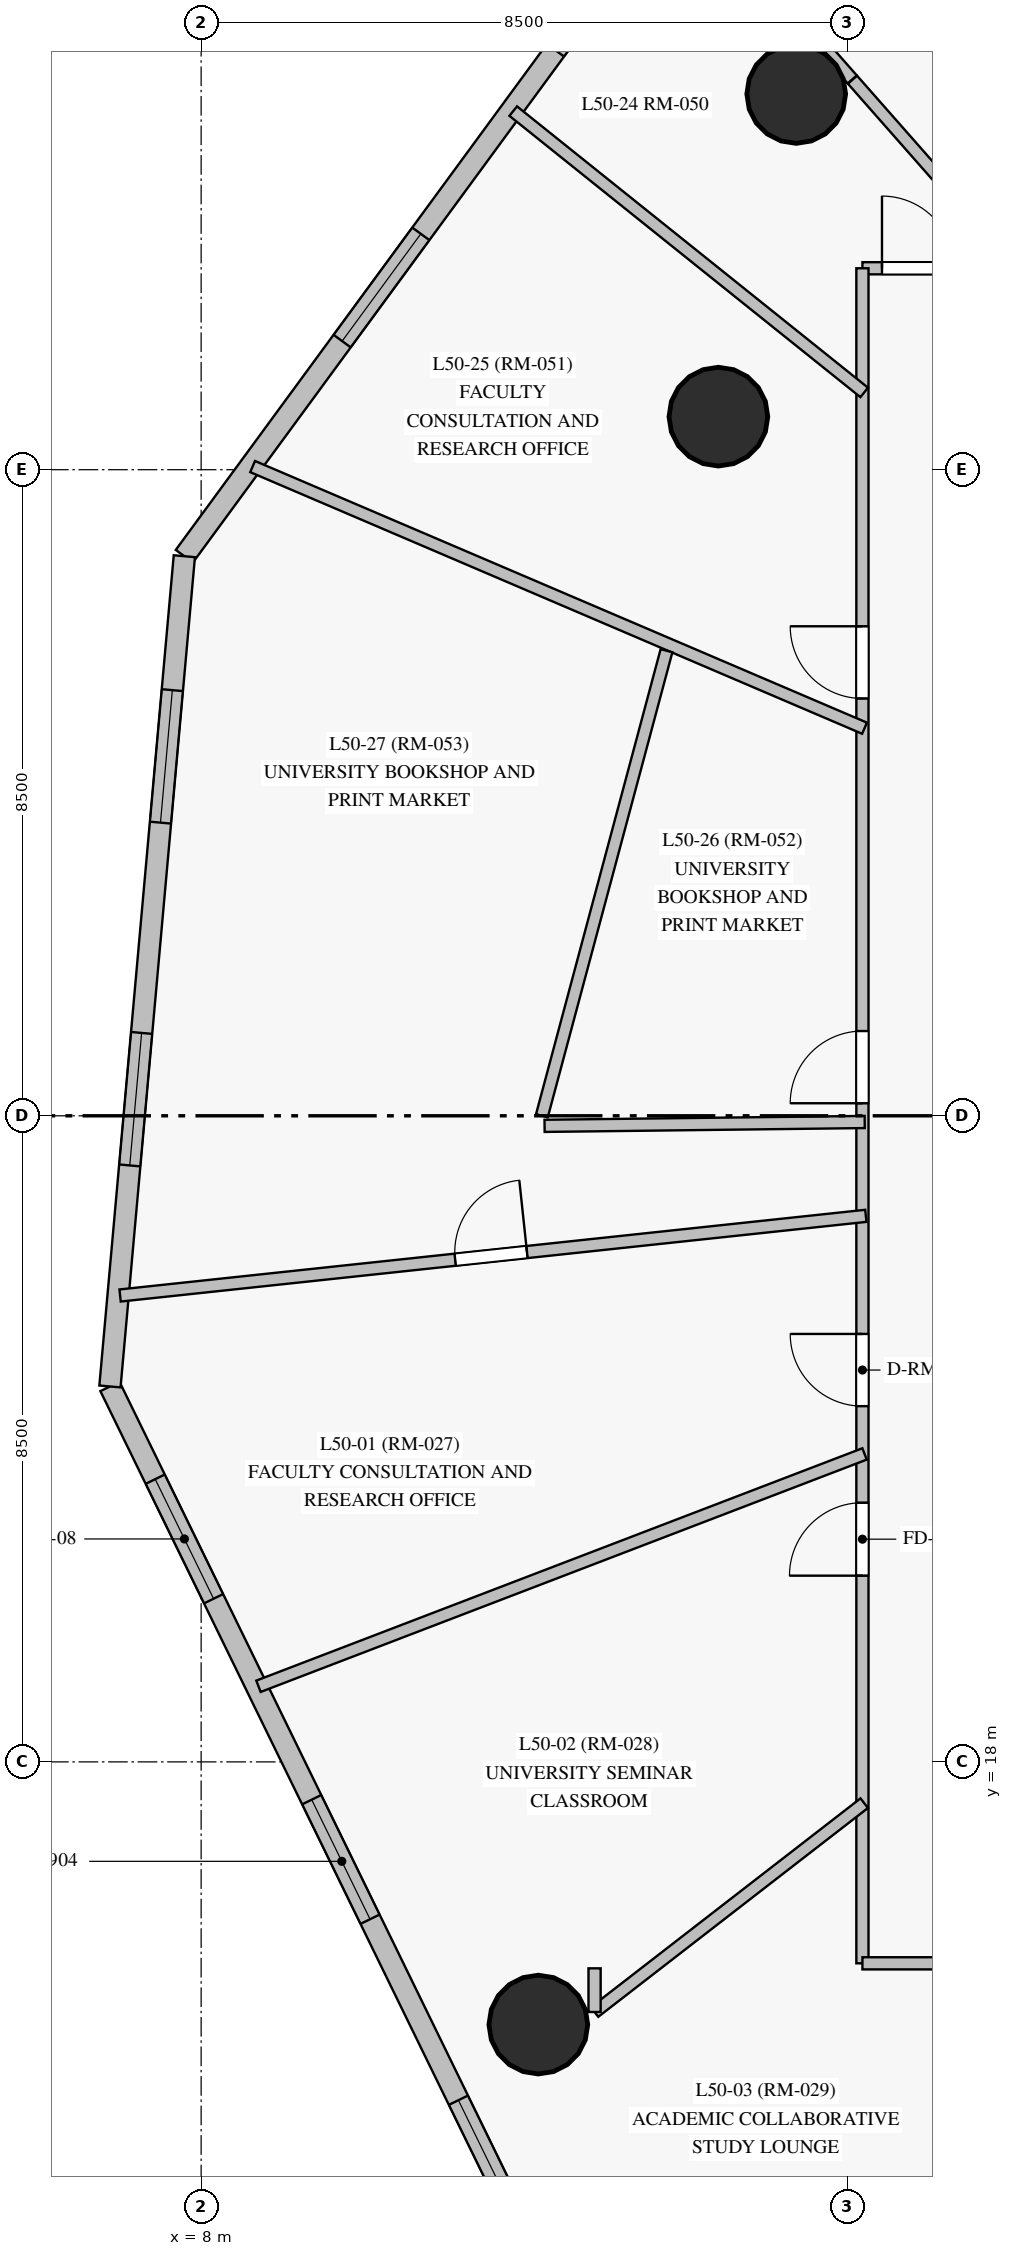
"""IFC4 building model, lengths in metres.
Left out: names, types, materials, properties, quantities, classifications, styles, units other than length and angle.
Written with IfcOpenShell. Run it as: python <this file> out.ifc"""

import sys

from ifc_helpers import new_model, si_unit, direction, frame, frame_2d, origin, origin_with_axes, origin_2d, place, context, subcontext, project, spatial, rectangle, circle, extrude, source, transform, mapped, element, fill, save


model = new_model("IFC4")
c1 = context("Model", 3, precision=1e-05, world=origin(), true_north=direction((0.0, 1.0)))
c2 = subcontext(c1, "Body", "Model", "MODEL_VIEW")
j1 = project(units=[si_unit("LENGTHUNIT", "METRE"), si_unit("PLANEANGLEUNIT", "RADIAN")], contexts=[c1])
p1 = place(None, origin())
s1 = spatial("IfcSite", under=j1, at=p1, CompositionType="ELEMENT")
p2 = place(p1, origin())
s2 = spatial("IfcBuilding", under=s1, at=p2, CompositionType="ELEMENT")
p3 = place(p2, frame((0.0, 0.0, 174.85)))
s3 = spatial("IfcBuildingStorey", under=s2, at=p3, CompositionType="ELEMENT", Elevation=174.85)
m1 = source(origin_with_axes(), c2, "Body", "SweptSolid", [
    extrude(circle(Radius=0.65, at=origin_2d()), origin(), (0.0, 0.0, 1.0), 3.05),
])
for number, where, z_axis, x_axis in (
    (1, (15.829, 39.943, 0.0), (0.0, 0.0, 1.0), (1.0, 0.0, 0.0)),
    (2, (14.805, 35.698, 0.0), (0.0, 0.0, 1.0), (1.0, 0.0, 0.0)),
    (3, (12.436, 14.544, 0.0), (0.0, 0.0, 1.0), (1.0, 0.0, 0.0)),
):
    element("IfcColumn", number, at=place(p3, frame(where, z_axis=z_axis, x_axis=x_axis)), inside=s3, PredefinedType="COLUMN", context=c2, shape_type="MappedRepresentation", body=[
        mapped(m1, transform((0.0, 0.0, 0.0), scale=1.0)),
    ])
p4 = place(p3, frame((6.8, 22.939, 0.0), z_axis=(0.0, 0.0, 1.0), x_axis=(0.438723195054, -0.898622255523, 0.0)))
e4 = element("IfcWall", 4, at=p4, inside=s3, PredefinedType="SOLIDWALL", context=c2, shape_type="SweptSolid", body=[
    extrude(rectangle(XDim=13.904, YDim=0.28, at=frame_2d((6.952, 0.0))), origin(), (0.0, 0.0, 1.0), 2.825),
])
p5 = place(p4, frame((1.357, 0.0, 0.85)))
e5 = element("IfcOpeningElement", 5, at=p5, cuts=e4, PredefinedType="OPENING", context=c2, shape_type="SweptSolid", body=[
    extrude(rectangle(XDim=1.75, YDim=1.65, at=frame_2d((0.875, 0.825))), frame((0.0, 0.15, 0.0), z_axis=(0.0, -1.0, 0.0), x_axis=(1.0, 0.0, 0.0)), (0.0, 0.0, 1.0), 0.3),
])
p6 = place(p4, frame((6.05, 0.0, 0.85)))
e6 = element("IfcOpeningElement", 6, at=p6, cuts=e4, PredefinedType="OPENING", context=c2, shape_type="SweptSolid", body=[
    extrude(rectangle(XDim=1.75, YDim=1.65, at=frame_2d((0.875, 0.825))), frame((0.0, 0.15, 0.0), z_axis=(0.0, -1.0, 0.0), x_axis=(1.0, 0.0, 0.0)), (0.0, 0.0, 1.0), 0.3),
])
p7 = place(p4, frame((10.449, 0.0, 0.85)))
e7 = element("IfcOpeningElement", 7, at=p7, cuts=e4, PredefinedType="OPENING", context=c2, shape_type="SweptSolid", body=[
    extrude(rectangle(XDim=1.75, YDim=1.65, at=frame_2d((0.875, 0.825))), frame((0.0, 0.15, 0.0), z_axis=(0.0, -1.0, 0.0), x_axis=(1.0, 0.0, 0.0)), (0.0, 0.0, 1.0), 0.3),
])
p8 = place(p3, frame((16.003, 45.073, 0.0), z_axis=(0.0, 0.0, 1.0), x_axis=(-0.591484690677, -0.806316228718, 0.0)))
e8 = element("IfcWall", 8, at=p8, inside=s3, PredefinedType="SOLIDWALL", context=c2, shape_type="SweptSolid", body=[
    extrude(rectangle(XDim=13.904, YDim=0.28, at=frame_2d((6.952, 0.0))), origin(), (0.0, 0.0, 1.0), 2.825),
])
p9 = place(p8, frame((0.617, 0.0, 0.85)))
e9 = element("IfcOpeningElement", 9, at=p9, cuts=e8, PredefinedType="OPENING", context=c2, shape_type="SweptSolid", body=[
    extrude(rectangle(XDim=1.75, YDim=1.65, at=frame_2d((0.875, 0.825))), frame((0.0, 0.15, 0.0), z_axis=(0.0, -1.0, 0.0), x_axis=(1.0, 0.0, 0.0)), (0.0, 0.0, 1.0), 0.3),
])
p10 = place(p8, frame((3.899, 0.0, 0.85)))
e10 = element("IfcOpeningElement", 10, at=p10, cuts=e8, PredefinedType="OPENING", context=c2, shape_type="SweptSolid", body=[
    extrude(rectangle(XDim=1.75, YDim=1.65, at=frame_2d((0.875, 0.825))), frame((0.0, 0.15, 0.0), z_axis=(0.0, -1.0, 0.0), x_axis=(1.0, 0.0, 0.0)), (0.0, 0.0, 1.0), 0.3),
])
p11 = place(p8, frame((8.644, 0.0, 0.85)))
e11 = element("IfcOpeningElement", 11, at=p11, cuts=e8, PredefinedType="OPENING", context=c2, shape_type="SweptSolid", body=[
    extrude(rectangle(XDim=1.75, YDim=1.65, at=frame_2d((0.875, 0.825))), frame((0.0, 0.15, 0.0), z_axis=(0.0, -1.0, 0.0), x_axis=(1.0, 0.0, 0.0)), (0.0, 0.0, 1.0), 0.3),
])
p12 = place(p3, frame((7.779, 33.862, 0.0), z_axis=(0.0, 0.0, 1.0), x_axis=(-0.08925100572, -0.996009165609, 0.0)))
e12 = element("IfcWall", 12, at=p12, inside=s3, PredefinedType="SOLIDWALL", context=c2, shape_type="SweptSolid", body=[
    extrude(rectangle(XDim=10.966, YDim=0.28, at=frame_2d((5.483, 0.0))), origin(), (0.0, 0.0, 1.0), 2.825),
])
p13 = place(p12, frame((1.769, 0.0, 0.85)))
e13 = element("IfcOpeningElement", 13, at=p13, cuts=e12, PredefinedType="OPENING", context=c2, shape_type="SweptSolid", body=[
    extrude(rectangle(XDim=1.75, YDim=1.65, at=frame_2d((0.875, 0.825))), frame((0.0, 0.15, 0.0), z_axis=(0.0, -1.0, 0.0), x_axis=(1.0, 0.0, 0.0)), (0.0, 0.0, 1.0), 0.3),
])
p14 = place(p12, frame((6.297, 0.0, 0.85)))
e14 = element("IfcOpeningElement", 14, at=p14, cuts=e12, PredefinedType="OPENING", context=c2, shape_type="SweptSolid", body=[
    extrude(rectangle(XDim=1.75, YDim=1.65, at=frame_2d((0.875, 0.825))), frame((0.0, 0.15, 0.0), z_axis=(0.0, -1.0, 0.0), x_axis=(1.0, 0.0, 0.0)), (0.0, 0.0, 1.0), 0.3),
])
p15 = place(p3, frame((16.7, 37.65, 0.0), z_axis=(0.0, 0.0, 1.0), x_axis=(1.0, 0.0, 0.0)))
e15 = element("IfcWall", 15, at=p15, inside=s3, PredefinedType="PARTITIONING", context=c2, shape_type="SweptSolid", body=[
    extrude(rectangle(XDim=23.5, YDim=0.16, at=frame_2d((11.75, 0.0))), origin(), (0.0, 0.0, 1.0), 2.375),
])
p16 = place(p15, frame((17.15, 0.0, 0.0)))
e16 = element("IfcOpeningElement", 16, at=p16, cuts=e15, PredefinedType="OPENING", context=c2, shape_type="SweptSolid", body=[
    extrude(rectangle(XDim=0.95, YDim=2.15, at=frame_2d((0.475, 1.075))), frame((0.0, 0.09, 0.0), z_axis=(0.0, -1.0, 0.0), x_axis=(1.0, 0.0, 0.0)), (0.0, 0.0, 1.0), 0.18),
])
p17 = place(p15, frame((14.31, 0.0, 0.0)))
e17 = element("IfcOpeningElement", 17, at=p17, cuts=e15, PredefinedType="OPENING", context=c2, shape_type="SweptSolid", body=[
    extrude(rectangle(XDim=0.95, YDim=2.15, at=frame_2d((0.475, 1.075))), frame((0.0, 0.09, 0.0), z_axis=(0.0, -1.0, 0.0), x_axis=(1.0, 0.0, 0.0)), (0.0, 0.0, 1.0), 0.18),
])
p18 = place(p15, frame((11.915, 0.0, 0.0)))
e18 = element("IfcOpeningElement", 18, at=p18, cuts=e15, PredefinedType="OPENING", context=c2, shape_type="SweptSolid", body=[
    extrude(rectangle(XDim=0.95, YDim=2.15, at=frame_2d((0.475, 1.075))), frame((0.0, 0.09, 0.0), z_axis=(0.0, -1.0, 0.0), x_axis=(1.0, 0.0, 0.0)), (0.0, 0.0, 1.0), 0.18),
])
p19 = place(p15, frame((7.75, 0.0, 0.0)))
e19 = element("IfcOpeningElement", 19, at=p19, cuts=e15, PredefinedType="OPENING", context=c2, shape_type="SweptSolid", body=[
    extrude(rectangle(XDim=0.95, YDim=2.15, at=frame_2d((0.475, 1.075))), frame((0.0, 0.09, 0.0), z_axis=(0.0, -1.0, 0.0), x_axis=(1.0, 0.0, 0.0)), (0.0, 0.0, 1.0), 0.18),
])
p20 = place(p15, frame((5.01, 0.0, 0.0)))
e20 = element("IfcOpeningElement", 20, at=p20, cuts=e15, PredefinedType="OPENING", context=c2, shape_type="SweptSolid", body=[
    extrude(rectangle(XDim=0.95, YDim=2.15, at=frame_2d((0.475, 1.075))), frame((0.0, 0.09, 0.0), z_axis=(0.0, -1.0, 0.0), x_axis=(1.0, 0.0, 0.0)), (0.0, 0.0, 1.0), 0.18),
])
p21 = place(p15, frame((0.257, 0.0, 0.0)))
e21 = element("IfcOpeningElement", 21, at=p21, cuts=e15, PredefinedType="OPENING", context=c2, shape_type="SweptSolid", body=[
    extrude(rectangle(XDim=0.95, YDim=2.15, at=frame_2d((0.475, 1.075))), frame((0.0, 0.09, 0.0), z_axis=(0.0, -1.0, 0.0), x_axis=(1.0, 0.0, 0.0)), (0.0, 0.0, 1.0), 0.18),
])
p22 = place(p3, frame((16.7, 15.35, 0.0), z_axis=(0.0, 0.0, 1.0), x_axis=(0.0, 1.0, 0.0)))
e22 = element("IfcWall", 22, at=p22, inside=s3, PredefinedType="PARTITIONING", context=c2, shape_type="SweptSolid", body=[
    extrude(rectangle(XDim=22.3, YDim=0.16, at=frame_2d((11.15, 0.0))), origin(), (0.0, 0.0, 1.0), 2.275),
])
p23 = place(p22, frame((7.33, 0.0, 0.0)))
e23 = element("IfcOpeningElement", 23, at=p23, cuts=e22, PredefinedType="OPENING", context=c2, shape_type="SweptSolid", body=[
    extrude(rectangle(XDim=0.95, YDim=2.15, at=frame_2d((0.475, 1.075))), frame((0.0, 0.09, 0.0), z_axis=(0.0, -1.0, 0.0), x_axis=(1.0, 0.0, 0.0)), (0.0, 0.0, 1.0), 0.18),
])
p24 = place(p22, frame((5.1, 0.0, 0.0)))
e24 = element("IfcOpeningElement", 24, at=p24, cuts=e22, PredefinedType="OPENING", context=c2, shape_type="SweptSolid", body=[
    extrude(rectangle(XDim=0.96, YDim=2.15, at=frame_2d((0.48, 1.075))), frame((0.0, 0.09, 0.0), z_axis=(0.0, -1.0, 0.0), x_axis=(1.0, 0.0, 0.0)), (0.0, 0.0, 1.0), 0.18),
])
p25 = place(p22, frame((16.64, 0.0, 0.0)))
e25 = element("IfcOpeningElement", 25, at=p25, cuts=e22, PredefinedType="OPENING", context=c2, shape_type="SweptSolid", body=[
    extrude(rectangle(XDim=0.95, YDim=2.15, at=frame_2d((0.475, 1.075))), frame((0.0, 0.09, 0.0), z_axis=(0.0, -1.0, 0.0), x_axis=(1.0, 0.0, 0.0)), (0.0, 0.0, 1.0), 0.18),
])
p26 = place(p22, frame((11.315, 0.0, 0.0)))
e26 = element("IfcOpeningElement", 26, at=p26, cuts=e22, PredefinedType="OPENING", context=c2, shape_type="SweptSolid", body=[
    extrude(rectangle(XDim=0.95, YDim=2.15, at=frame_2d((0.475, 1.075))), frame((0.0, 0.09, 0.0), z_axis=(0.0, -1.0, 0.0), x_axis=(1.0, 0.0, 0.0)), (0.0, 0.0, 1.0), 0.18),
])
p27 = place(p3, frame((27.55, 15.35, 0.0), z_axis=(0.0, 0.0, 1.0), x_axis=(-1.0, 0.0, 0.0)))
e27 = element("IfcWall", 27, at=p27, inside=s3, PredefinedType="PARTITIONING", context=c2, shape_type="SweptSolid", body=[
    extrude(rectangle(XDim=10.85, YDim=0.16, at=frame_2d((5.425, 0.0))), origin(), (0.0, 0.0, 1.0), 2.375),
])
p28 = place(p27, frame((7.663, 0.0, 0.0)))
e28 = element("IfcOpeningElement", 28, at=p28, cuts=e27, PredefinedType="OPENING", context=c2, shape_type="SweptSolid", body=[
    extrude(rectangle(XDim=0.95, YDim=2.15, at=frame_2d((0.475, 1.075))), frame((0.0, 0.09, 0.0), z_axis=(0.0, -1.0, 0.0), x_axis=(1.0, 0.0, 0.0)), (0.0, 0.0, 1.0), 0.18),
])
p29 = place(p27, frame((5.59, 0.0, 0.0)))
e29 = element("IfcOpeningElement", 29, at=p29, cuts=e27, PredefinedType="OPENING", context=c2, shape_type="SweptSolid", body=[
    extrude(rectangle(XDim=0.95, YDim=2.15, at=frame_2d((0.475, 1.075))), frame((0.0, 0.09, 0.0), z_axis=(0.0, -1.0, 0.0), x_axis=(1.0, 0.0, 0.0)), (0.0, 0.0, 1.0), 0.18),
])
p30 = place(p27, frame((3.323, 0.0, 0.0)))
e30 = element("IfcOpeningElement", 30, at=p30, cuts=e27, PredefinedType="OPENING", context=c2, shape_type="SweptSolid", body=[
    extrude(rectangle(XDim=0.95, YDim=2.15, at=frame_2d((0.475, 1.075))), frame((0.0, 0.09, 0.0), z_axis=(0.0, -1.0, 0.0), x_axis=(1.0, 0.0, 0.0)), (0.0, 0.0, 1.0), 0.18),
])
p31 = place(p27, frame((1.597, 0.0, 0.0)))
e31 = element("IfcOpeningElement", 31, at=p31, cuts=e27, PredefinedType="OPENING", context=c2, shape_type="SweptSolid", body=[
    extrude(rectangle(XDim=0.95, YDim=2.15, at=frame_2d((0.475, 1.075))), frame((0.0, 0.09, 0.0), z_axis=(0.0, -1.0, 0.0), x_axis=(1.0, 0.0, 0.0)), (0.0, 0.0, 1.0), 0.18),
])
p32 = place(p3, frame((6.934, 24.136, 0.0), z_axis=(0.0, 0.0, 1.0), x_axis=(0.994342242763, 0.106223840347, 0.0)))
e32 = element("IfcWall", 32, at=p32, inside=s3, PredefinedType="PARTITIONING", context=c2, shape_type="SweptSolid", body=[
    extrude(rectangle(XDim=9.867, YDim=0.16, at=frame_2d((4.934, 0.0))), origin(), (0.0, 0.0, 1.0), 2.825),
])
p33 = place(p32, frame((4.433, 0.0, 0.0)))
e33 = element("IfcOpeningElement", 33, at=p33, cuts=e32, PredefinedType="OPENING", context=c2, shape_type="SweptSolid", body=[
    extrude(rectangle(XDim=0.95, YDim=2.15, at=frame_2d((0.475, 1.075))), frame((0.0, 0.09, 0.0), z_axis=(0.0, -1.0, 0.0), x_axis=(1.0, 0.0, 0.0)), (0.0, 0.0, 1.0), 0.18),
])
p34 = place(p3, frame((16.728, 31.599, 0.0), z_axis=(0.0, 0.0, 1.0), x_axis=(-0.919460607176, 0.393182135723, 0.0)))
e34 = element("IfcWall", 34, at=p34, inside=s3, PredefinedType="PARTITIONING", context=c2, shape_type="SweptSolid", body=[
    extrude(rectangle(XDim=8.755, YDim=0.16, at=frame_2d((4.377, 0.0))), origin(), (0.0, 0.0, 1.0), 2.825),
])
p35 = place(p3, frame((16.728, 22.052, 0.0), z_axis=(0.0, 0.0, 1.0), x_axis=(-0.933737039781, -0.357959691225, 0.0)))
e35 = element("IfcWall", 35, at=p35, inside=s3, PredefinedType="PARTITIONING", context=c2, shape_type="SweptSolid", body=[
    extrude(rectangle(XDim=8.54, YDim=0.16, at=frame_2d((4.27, 0.0))), origin(), (0.0, 0.0, 1.0), 2.825),
])
p36 = place(p3, frame((20.699, 15.387, 0.0), z_axis=(0.0, 0.0, 1.0), x_axis=(-0.570926088809, -0.821001462311, 0.0)))
e36 = element("IfcWall", 36, at=p36, inside=s3, PredefinedType="PARTITIONING", context=c2, shape_type="SweptSolid", body=[
    extrude(rectangle(XDim=6.513, YDim=0.16, at=frame_2d((3.256, 0.0))), origin(), (0.0, 0.0, 1.0), 2.825),
])
p37 = place(p3, frame((12.483, 26.5, 0.0), z_axis=(0.0, 0.0, 1.0), x_axis=(0.258806723076, 0.965929127882, 0.0)))
e37 = element("IfcWall", 37, at=p37, inside=s3, PredefinedType="PARTITIONING", context=c2, shape_type="SweptSolid", body=[
    extrude(rectangle(XDim=6.334, YDim=0.16, at=frame_2d((3.167, 0.0))), origin(), (0.0, 0.0, 1.0), 2.275),
])
p38 = place(p3, frame((16.723, 36.017, 0.0), z_axis=(0.0, 0.0, 1.0), x_axis=(-0.780288897002, 0.625419249157, 0.0)))
e38 = element("IfcWall", 38, at=p38, inside=s3, PredefinedType="PARTITIONING", context=c2, shape_type="SweptSolid", body=[
    extrude(rectangle(XDim=5.918, YDim=0.16, at=frame_2d((2.959, 0.0))), origin(), (0.0, 0.0, 1.0), 2.825),
])
p39 = place(p3, frame((16.724, 17.457, 0.0), z_axis=(0.0, 0.0, 1.0), x_axis=(-0.79066592858, -0.612247816969, 0.0)))
e39 = element("IfcWall", 39, at=p39, inside=s3, PredefinedType="PARTITIONING", context=c2, shape_type="SweptSolid", body=[
    extrude(rectangle(XDim=4.487, YDim=0.16, at=frame_2d((2.243, 0.0))), origin(), (0.0, 0.0, 1.0), 2.275),
])
p40 = place(p3, frame((16.73, 26.418, 0.0), z_axis=(0.0, 0.0, 1.0), x_axis=(-0.99992731902, -0.012056395708, 0.0)))
e40 = element("IfcWall", 40, at=p40, inside=s3, PredefinedType="PARTITIONING", context=c2, shape_type="SweptSolid", body=[
    extrude(rectangle(XDim=4.212, YDim=0.16, at=frame_2d((2.106, 0.0))), origin(), (0.0, 0.0, 1.0), 2.825),
])
p41 = place(p3, frame((18.785, 37.616, 0.0), z_axis=(0.0, 0.0, 1.0), x_axis=(-0.66112037689, 0.750279845964, 0.0)))
e41 = element("IfcWall", 41, at=p41, inside=s3, PredefinedType="PARTITIONING", context=c2, shape_type="SweptSolid", body=[
    extrude(rectangle(XDim=3.352, YDim=0.16, at=frame_2d((1.676, 0.0))), origin(), (0.0, 0.0, 1.0), 2.825),
])
p42 = place(p3, frame((16.566, 40.135, 0.0), z_axis=(0.0, 0.0, 1.0), x_axis=(-0.661110365764, 0.750288667301, 0.0)))
e42 = element("IfcWall", 42, at=p42, inside=s3, PredefinedType="PARTITIONING", context=c2, shape_type="SweptSolid", body=[
    extrude(rectangle(XDim=3.444, YDim=0.16, at=frame_2d((1.722, 0.0))), origin(), (0.0, 0.0, 1.0), 2.825),
])
p43 = place(p3, frame((13.176, 14.71, 0.0), z_axis=(0.0, 0.0, 1.0), x_axis=(0.0, 1.0, 0.0)))
e43 = element("IfcWall", 43, at=p43, inside=s3, PredefinedType="PARTITIONING", context=c2, shape_type="SweptSolid", body=[
    extrude(rectangle(XDim=0.574, YDim=0.16, at=frame_2d((0.287, 0.0))), origin(), (0.0, 0.0, 1.0), 2.275),
])
m2 = source(origin_with_axes(), c2, "Body", "SweptSolid", [
    extrude(rectangle(XDim=1.75, YDim=1.65, at=frame_2d((0.875, 0.825))), frame((0.0, 0.03, 0.0), z_axis=(0.0, -1.0, 0.0), x_axis=(1.0, 0.0, 0.0)), (0.0, 0.0, 1.0), 0.06),
])
p44 = place(p5, origin())
e44 = element("IfcWindow", 44, at=p44, inside=s3, PartitioningType="SINGLE_PANEL", PredefinedType="WINDOW", context=c2, shape_type="MappedRepresentation", body=[
    mapped(m2, transform((0.0, 0.0, 0.0), scale=1.0)),
])
fill(e5, e44)
p45 = place(p6, origin())
e45 = element("IfcWindow", 45, at=p45, inside=s3, PartitioningType="SINGLE_PANEL", PredefinedType="WINDOW", context=c2, shape_type="MappedRepresentation", body=[
    mapped(m2, transform((0.0, 0.0, 0.0), scale=1.0)),
])
fill(e6, e45)
p46 = place(p7, origin())
e46 = element("IfcWindow", 46, at=p46, inside=s3, PartitioningType="SINGLE_PANEL", PredefinedType="WINDOW", context=c2, shape_type="MappedRepresentation", body=[
    mapped(m2, transform((0.0, 0.0, 0.0), scale=1.0)),
])
fill(e7, e46)
p47 = place(p11, origin())
e47 = element("IfcWindow", 47, at=p47, inside=s3, PartitioningType="SINGLE_PANEL", PredefinedType="WINDOW", context=c2, shape_type="MappedRepresentation", body=[
    mapped(m2, transform((0.0, 0.0, 0.0), scale=1.0)),
])
fill(e11, e47)
p48 = place(p13, origin())
e48 = element("IfcWindow", 48, at=p48, inside=s3, PartitioningType="SINGLE_PANEL", PredefinedType="WINDOW", context=c2, shape_type="MappedRepresentation", body=[
    mapped(m2, transform((0.0, 0.0, 0.0), scale=1.0)),
])
fill(e13, e48)
p49 = place(p14, origin())
e49 = element("IfcWindow", 49, at=p49, inside=s3, PartitioningType="SINGLE_PANEL", PredefinedType="WINDOW", context=c2, shape_type="MappedRepresentation", body=[
    mapped(m2, transform((0.0, 0.0, 0.0), scale=1.0)),
])
fill(e14, e49)
m3 = source(origin_with_axes(), c2, "Body", "SweptSolid", [
    extrude(rectangle(XDim=0.95, YDim=2.15, at=frame_2d((0.475, 1.075))), frame((0.0, 0.025, 0.0), z_axis=(0.0, -1.0, 0.0), x_axis=(1.0, 0.0, 0.0)), (0.0, 0.0, 1.0), 0.05),
])
p50 = place(p23, origin())
e50 = element("IfcDoor", 50, at=p50, inside=s3, OperationType="SINGLE_SWING_RIGHT", PredefinedType="DOOR", context=c2, shape_type="MappedRepresentation", body=[
    mapped(m3, transform((0.0, 0.0, 0.0), scale=1.0)),
])
fill(e23, e50)
m4 = source(origin_with_axes(), c2, "Body", "SweptSolid", [
    extrude(rectangle(XDim=0.96, YDim=2.15, at=frame_2d((0.48, 1.075))), frame((0.0, 0.025, 0.0), z_axis=(0.0, -1.0, 0.0), x_axis=(1.0, 0.0, 0.0)), (0.0, 0.0, 1.0), 0.05),
])
p51 = place(p24, origin())
e51 = element("IfcDoor", 51, at=p51, inside=s3, OperationType="SINGLE_SWING_LEFT", PredefinedType="DOOR", context=c2, shape_type="MappedRepresentation", body=[
    mapped(m4, transform((0.0, 0.0, 0.0), scale=1.0)),
])
fill(e24, e51)
p52 = place(p21, origin())
e52 = element("IfcDoor", 52, at=p52, inside=s3, OperationType="SINGLE_SWING_LEFT", PredefinedType="DOOR", context=c2, shape_type="MappedRepresentation", body=[
    mapped(m3, transform((0.0, 0.0, 0.0), scale=1.0)),
])
fill(e21, e52)
p53 = place(p25, origin())
e53 = element("IfcDoor", 53, at=p53, inside=s3, OperationType="SINGLE_SWING_RIGHT", PredefinedType="DOOR", context=c2, shape_type="MappedRepresentation", body=[
    mapped(m3, transform((0.0, 0.0, 0.0), scale=1.0)),
])
fill(e25, e53)
p54 = place(p26, origin())
e54 = element("IfcDoor", 54, at=p54, inside=s3, OperationType="SINGLE_SWING_LEFT", PredefinedType="DOOR", context=c2, shape_type="MappedRepresentation", body=[
    mapped(m3, transform((0.0, 0.0, 0.0), scale=1.0)),
])
fill(e26, e54)
p55 = place(p33, origin())
e55 = element("IfcDoor", 55, at=p55, inside=s3, OperationType="SINGLE_SWING_RIGHT", PredefinedType="DOOR", context=c2, shape_type="MappedRepresentation", body=[
    mapped(m3, transform((0.0, 0.0, 0.0), scale=1.0)),
])
fill(e33, e55)
save(model, sys.argv[1])
